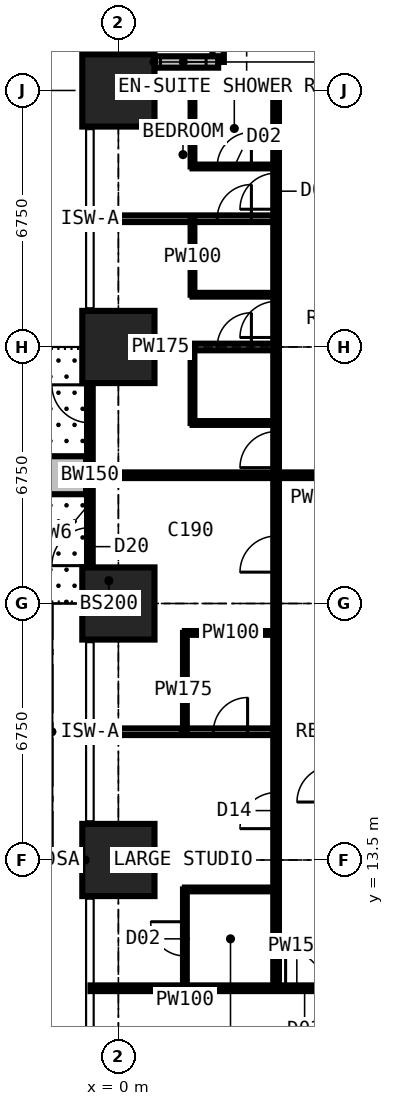
"""IFC4 building model, lengths in metres.
Left out: names, types, materials, properties, quantities, classifications, styles, units other than length and angle.
Written with IfcOpenShell. Run it as: python <this file> out.ifc"""

import sys

from ifc_helpers import new_model, si_unit, direction, frame, frame_2d, origin, origin_2d, place, context, subcontext, project, spatial, rectangle, extrude, element, fill, save


model = new_model("IFC4")
c1 = context("Model", 3, precision=1e-05, world=origin(), true_north=direction((0.0, 1.0)))
c2 = subcontext(c1, "Body", "Model", "MODEL_VIEW")
j1 = project(units=[si_unit("LENGTHUNIT", "METRE"), si_unit("PLANEANGLEUNIT", "RADIAN")], contexts=[c1])
p1 = place(None, origin())
s1 = spatial("IfcSite", under=j1, at=p1, CompositionType="ELEMENT")
p2 = place(p1, origin())
s2 = spatial("IfcBuilding", under=s1, at=p2, CompositionType="ELEMENT")
p3 = place(p2, frame((0.0, 0.0, 43.2)))
s3 = spatial("IfcBuildingStorey", under=s2, at=p3, CompositionType="ELEMENT", Elevation=43.2)
for number, where, z_axis, x_axis in (
    (1, (0.0, 13.5, 0.0), (0.0, 0.0, 1.0), (1.0, 0.0, 0.0)),
    (2, (0.0, 20.25, 0.0), (0.0, 0.0, 1.0), (1.0, 0.0, 0.0)),
    (3, (0.0, 27.0, 0.0), (0.0, 0.0, 1.0), (1.0, 0.0, 0.0)),
    (4, (0.0, 33.75, 0.0), (0.0, 0.0, 1.0), (1.0, 0.0, 0.0)),
):
    element("IfcColumn", number, at=place(p3, frame(where, z_axis=z_axis, x_axis=x_axis)), inside=s3, PredefinedType="COLUMN", context=c2, shape_type="SweptSolid", body=[
        extrude(rectangle(XDim=1.9, YDim=1.9, at=origin_2d()), origin(), (0.0, 0.0, 1.0), 3.6),
    ])
p4 = place(p3, frame((2.625, 37.875, 0.0), z_axis=(0.0, 0.0, 1.0), x_axis=(0.0, -1.0, 0.0)))
e5 = element("IfcWall", 5, at=p4, inside=s3, PredefinedType="SOLIDWALL", context=c2, shape_type="SweptSolid", body=[
    extrude(rectangle(XDim=3.375, YDim=0.3, at=frame_2d((1.688, 0.0))), origin(), (0.0, 0.0, 1.0), 3.375),
])
p5 = place(p4, frame((0.788, 0.0, 0.6)))
e6 = element("IfcOpeningElement", 6, at=p5, cuts=e5, PredefinedType="OPENING", context=c2, shape_type="SweptSolid", body=[
    extrude(rectangle(XDim=1.8, YDim=2.1, at=frame_2d((0.9, 1.05))), frame((0.0, 0.16, 0.0), z_axis=(0.0, -1.0, 0.0), x_axis=(1.0, 0.0, 0.0)), (0.0, 0.0, 1.0), 0.32),
])
p6 = place(p3, frame((2.625, 34.5, 0.0), z_axis=(0.0, 0.0, 1.0), x_axis=(-1.0, 0.0, 0.0)))
e7 = element("IfcWall", 7, at=p6, inside=s3, PredefinedType="SOLIDWALL", context=c2, shape_type="SweptSolid", body=[
    extrude(rectangle(XDim=3.375, YDim=0.3, at=frame_2d((1.688, 0.0))), origin(), (0.0, 0.0, 1.0), 3.375),
])
p7 = place(p6, frame((0.317, 0.0, 0.9)))
e8 = element("IfcOpeningElement", 8, at=p7, cuts=e7, PredefinedType="OPENING", context=c2, shape_type="SweptSolid", body=[
    extrude(rectangle(XDim=1.2, YDim=1.8, at=frame_2d((0.6, 0.9))), frame((0.0, 0.16, 0.0), z_axis=(0.0, -1.0, 0.0), x_axis=(1.0, 0.0, 0.0)), (0.0, 0.0, 1.0), 0.32),
])
p8 = place(p3, frame((-0.75, 20.25, 0.0), z_axis=(0.0, 0.0, 1.0), x_axis=(0.0, 1.0, 0.0)))
e9 = element("IfcWall", 9, at=p8, inside=s3, PredefinedType="SOLIDWALL", context=c2, shape_type="SweptSolid", body=[
    extrude(rectangle(XDim=6.75, YDim=0.15, at=frame_2d((3.375, 0.0))), origin(), (0.0, 0.0, 1.0), 3.375),
])
p9 = place(p8, frame((0.996, 0.0, 0.0)))
e10 = element("IfcOpeningElement", 10, at=p9, cuts=e9, PredefinedType="OPENING", context=c2, shape_type="SweptSolid", body=[
    extrude(rectangle(XDim=1.0, YDim=2.2, at=frame_2d((0.5, 1.1))), frame((0.0, 0.085, 0.0), z_axis=(0.0, -1.0, 0.0), x_axis=(1.0, 0.0, 0.0)), (0.0, 0.0, 1.0), 0.17),
])
p10 = place(p8, frame((2.042, 0.0, 0.9)))
e11 = element("IfcOpeningElement", 11, at=p10, cuts=e9, PredefinedType="OPENING", context=c2, shape_type="SweptSolid", body=[
    extrude(rectangle(XDim=1.2, YDim=1.8, at=frame_2d((0.6, 0.9))), frame((0.0, 0.085, 0.0), z_axis=(0.0, -1.0, 0.0), x_axis=(1.0, 0.0, 0.0)), (0.0, 0.0, 1.0), 0.17),
])
p11 = place(p8, frame((4.754, 0.0, 0.0)))
e12 = element("IfcOpeningElement", 12, at=p11, cuts=e9, PredefinedType="OPENING", context=c2, shape_type="SweptSolid", body=[
    extrude(rectangle(XDim=1.0, YDim=2.2, at=frame_2d((0.5, 1.1))), frame((0.0, 0.085, 0.0), z_axis=(0.0, -1.0, 0.0), x_axis=(1.0, 0.0, 0.0)), (0.0, 0.0, 1.0), 0.17),
])
p12 = place(p8, frame((3.508, 0.0, 0.9)))
e13 = element("IfcOpeningElement", 13, at=p12, cuts=e9, PredefinedType="OPENING", context=c2, shape_type="SweptSolid", body=[
    extrude(rectangle(XDim=1.2, YDim=1.8, at=frame_2d((0.6, 0.9))), frame((0.0, 0.085, 0.0), z_axis=(0.0, -1.0, 0.0), x_axis=(1.0, 0.0, 0.0)), (0.0, 0.0, 1.0), 0.17),
])
p13 = place(p3, frame((-0.85, 23.625, 0.0), z_axis=(0.0, 0.0, 1.0), x_axis=(-1.0, 0.0, 0.0)))
e14 = element("IfcWall", 14, at=p13, inside=s3, PredefinedType="USERDEFINED", context=c2, shape_type="SweptSolid", body=[
    extrude(rectangle(XDim=2.2, YDim=1.0, at=frame_2d((1.1, 0.0))), origin(), (0.0, 0.0, 1.0), 0.9),
])
p14 = place(p3, frame((-0.734, 10.125, 0.0), z_axis=(0.0, 0.0, 1.0), x_axis=(1.0, 0.0, 0.0)))
e15 = element("IfcWall", 15, at=p14, inside=s3, PredefinedType="PARTITIONING", context=c2, shape_type="SweptSolid", body=[
    extrude(rectangle(XDim=10.859, YDim=0.15, at=frame_2d((5.429, 0.0))), origin(), (0.0, 0.0, 1.0), 3.375),
])
p15 = place(p14, frame((5.134, 0.0, 0.0)))
e16 = element("IfcOpeningElement", 16, at=p15, cuts=e15, PredefinedType="OPENING", context=c2, shape_type="SweptSolid", body=[
    extrude(rectangle(XDim=1.0, YDim=2.2, at=frame_2d((0.5, 1.1))), frame((0.0, 0.085, 0.0), z_axis=(0.0, -1.0, 0.0), x_axis=(1.0, 0.0, 0.0)), (0.0, 0.0, 1.0), 0.17),
])
p16 = place(p3, frame((-0.734, 16.875, 0.0), z_axis=(0.0, 0.0, 1.0), x_axis=(1.0, 0.0, 0.0)))
e17 = element("IfcWall", 17, at=p16, inside=s3, PredefinedType="PARTITIONING", context=c2, shape_type="SweptSolid", body=[
    extrude(rectangle(XDim=4.884, YDim=0.175, at=frame_2d((2.442, 0.0))), origin(), (0.0, 0.0, 1.0), 3.375),
])
p17 = place(p16, frame((3.234, 0.0, 0.0)))
e18 = element("IfcOpeningElement", 18, at=p17, cuts=e17, PredefinedType="OPENING", context=c2, shape_type="SweptSolid", body=[
    extrude(rectangle(XDim=0.9, YDim=2.2, at=frame_2d((0.45, 1.1))), frame((0.0, 0.097, 0.0), z_axis=(0.0, -1.0, 0.0), x_axis=(1.0, 0.0, 0.0)), (0.0, 0.0, 1.0), 0.195),
])
p18 = place(p3, frame((-0.734, 23.625, 0.0), z_axis=(0.0, 0.0, 1.0), x_axis=(1.0, 0.0, 0.0)))
e19 = element("IfcWall", 19, at=p18, inside=s3, PredefinedType="PARTITIONING", context=c2, shape_type="SweptSolid", body=[
    extrude(rectangle(XDim=12.034, YDim=0.15, at=frame_2d((6.017, 0.0))), origin(), (0.0, 0.0, 1.0), 3.375),
])
p19 = place(p3, frame((-0.734, 27.0, 0.0), z_axis=(0.0, 0.0, 1.0), x_axis=(1.0, 0.0, 0.0)))
e20 = element("IfcWall", 20, at=p19, inside=s3, PredefinedType="PARTITIONING", context=c2, shape_type="SweptSolid", body=[
    extrude(rectangle(XDim=4.884, YDim=0.175, at=frame_2d((2.442, 0.0))), origin(), (0.0, 0.0, 1.0), 2.61),
])
p20 = place(p19, frame((3.334, 0.0, 0.0)))
e21 = element("IfcOpeningElement", 21, at=p20, cuts=e20, PredefinedType="OPENING", context=c2, shape_type="SweptSolid", body=[
    extrude(rectangle(XDim=0.9, YDim=2.2, at=frame_2d((0.45, 1.1))), frame((0.0, 0.097, 0.0), z_axis=(0.0, -1.0, 0.0), x_axis=(1.0, 0.0, 0.0)), (0.0, 0.0, 1.0), 0.195),
])
p21 = place(p3, frame((-0.734, 30.375, 0.0), z_axis=(0.0, 0.0, 1.0), x_axis=(1.0, 0.0, 0.0)))
e22 = element("IfcWall", 22, at=p21, inside=s3, PredefinedType="PARTITIONING", context=c2, shape_type="SweptSolid", body=[
    extrude(rectangle(XDim=4.884, YDim=0.175, at=frame_2d((2.442, 0.0))), origin(), (0.0, 0.0, 1.0), 3.375),
])
p22 = place(p21, frame((3.334, 0.0, 0.0)))
e23 = element("IfcOpeningElement", 23, at=p22, cuts=e22, PredefinedType="OPENING", context=c2, shape_type="SweptSolid", body=[
    extrude(rectangle(XDim=0.9, YDim=2.2, at=frame_2d((0.45, 1.1))), frame((0.0, 0.097, 0.0), z_axis=(0.0, -1.0, 0.0), x_axis=(1.0, 0.0, 0.0)), (0.0, 0.0, 1.0), 0.195),
])
p23 = place(p3, frame((-0.734, 33.75, 0.0), z_axis=(0.0, 0.0, 1.0), x_axis=(1.0, 0.0, 0.0)))
e24 = element("IfcWall", 24, at=p23, inside=s3, PredefinedType="PARTITIONING", context=c2, shape_type="SweptSolid", body=[
    extrude(rectangle(XDim=10.859, YDim=0.15, at=frame_2d((5.429, 0.0))), origin(), (0.0, 0.0, 1.0), 2.877),
])
p24 = place(p23, frame((8.434, 0.0, 0.0)))
e25 = element("IfcOpeningElement", 25, at=p24, cuts=e24, PredefinedType="OPENING", context=c2, shape_type="SweptSolid", body=[
    extrude(rectangle(XDim=1.0, YDim=2.2, at=frame_2d((0.5, 1.1))), frame((0.0, 0.085, 0.0), z_axis=(0.0, -1.0, 0.0), x_axis=(1.0, 0.0, 0.0)), (0.0, 0.0, 1.0), 0.17),
])
p25 = place(p3, frame((1.75, 10.125, 0.0), z_axis=(0.0, 0.0, 1.0), x_axis=(0.0, 1.0, 0.0)))
e26 = element("IfcWall", 26, at=p25, inside=s3, PredefinedType="PARTITIONING", context=c2, shape_type="SweptSolid", body=[
    extrude(rectangle(XDim=2.6, YDim=0.1, at=frame_2d((1.3, 0.0))), origin(), (0.0, 0.0, 1.0), 3.375),
])
p26 = place(p25, frame((0.85, 0.0, 0.0)))
e27 = element("IfcOpeningElement", 27, at=p26, cuts=e26, PredefinedType="OPENING", context=c2, shape_type="SweptSolid", body=[
    extrude(rectangle(XDim=0.9, YDim=2.2, at=frame_2d((0.45, 1.1))), frame((0.0, 0.06, 0.0), z_axis=(0.0, -1.0, 0.0), x_axis=(1.0, 0.0, 0.0)), (0.0, 0.0, 1.0), 0.12),
])
p27 = place(p3, frame((1.75, 12.725, 0.0), z_axis=(0.0, 0.0, 1.0), x_axis=(1.0, 0.0, 0.0)))
e28 = element("IfcWall", 28, at=p27, inside=s3, PredefinedType="PARTITIONING", context=c2, shape_type="SweptSolid", body=[
    extrude(rectangle(XDim=2.4, YDim=0.1, at=frame_2d((1.2, 0.0))), origin(), (0.0, 0.0, 1.0), 3.375),
])
p28 = place(p3, frame((1.75, 16.875, 0.0), z_axis=(0.0, 0.0, 1.0), x_axis=(0.0, 1.0, 0.0)))
e29 = element("IfcWall", 29, at=p28, inside=s3, PredefinedType="PARTITIONING", context=c2, shape_type="SweptSolid", body=[
    extrude(rectangle(XDim=2.6, YDim=0.1, at=frame_2d((1.3, 0.0))), origin(), (0.0, 0.0, 1.0), 3.375),
])
p29 = place(p3, frame((1.75, 19.475, 0.0), z_axis=(0.0, 0.0, 1.0), x_axis=(1.0, 0.0, 0.0)))
e30 = element("IfcWall", 30, at=p29, inside=s3, PredefinedType="PARTITIONING", context=c2, shape_type="SweptSolid", body=[
    extrude(rectangle(XDim=2.4, YDim=0.1, at=frame_2d((1.2, 0.0))), origin(), (0.0, 0.0, 1.0), 3.375),
])
p30 = place(p3, frame((1.95, 25.0, 0.0), z_axis=(0.0, 0.0, 1.0), x_axis=(0.0, 1.0, 0.0)))
e31 = element("IfcWall", 31, at=p30, inside=s3, PredefinedType="PARTITIONING", context=c2, shape_type="SweptSolid", body=[
    extrude(rectangle(XDim=2.0, YDim=0.1, at=frame_2d((1.0, 0.0))), origin(), (0.0, 0.0, 1.0), 3.375),
])
p31 = place(p3, frame((1.95, 25.0, 0.0), z_axis=(0.0, 0.0, 1.0), x_axis=(1.0, 0.0, 0.0)))
e32 = element("IfcWall", 32, at=p31, inside=s3, PredefinedType="PARTITIONING", context=c2, shape_type="SweptSolid", body=[
    extrude(rectangle(XDim=2.2, YDim=0.1, at=frame_2d((1.1, 0.0))), origin(), (0.0, 0.0, 1.0), 3.375),
])
p32 = place(p3, frame((1.95, 28.375, 0.0), z_axis=(0.0, 0.0, 1.0), x_axis=(0.0, 1.0, 0.0)))
e33 = element("IfcWall", 33, at=p32, inside=s3, PredefinedType="PARTITIONING", context=c2, shape_type="SweptSolid", body=[
    extrude(rectangle(XDim=2.0, YDim=0.1, at=frame_2d((1.0, 0.0))), origin(), (0.0, 0.0, 1.0), 3.375),
])
p33 = place(p3, frame((1.95, 28.375, 0.0), z_axis=(0.0, 0.0, 1.0), x_axis=(1.0, 0.0, 0.0)))
e34 = element("IfcWall", 34, at=p33, inside=s3, PredefinedType="PARTITIONING", context=c2, shape_type="SweptSolid", body=[
    extrude(rectangle(XDim=2.2, YDim=0.1, at=frame_2d((1.1, 0.0))), origin(), (0.0, 0.0, 1.0), 3.375),
])
p34 = place(p3, frame((1.95, 31.75, 0.0), z_axis=(0.0, 0.0, 1.0), x_axis=(0.0, 1.0, 0.0)))
e35 = element("IfcWall", 35, at=p34, inside=s3, PredefinedType="PARTITIONING", context=c2, shape_type="SweptSolid", body=[
    extrude(rectangle(XDim=2.0, YDim=0.1, at=frame_2d((1.0, 0.0))), origin(), (0.0, 0.0, 1.0), 3.375),
])
p35 = place(p3, frame((1.95, 31.75, 0.0), z_axis=(0.0, 0.0, 1.0), x_axis=(1.0, 0.0, 0.0)))
e36 = element("IfcWall", 36, at=p35, inside=s3, PredefinedType="PARTITIONING", context=c2, shape_type="SweptSolid", body=[
    extrude(rectangle(XDim=2.2, YDim=0.1, at=frame_2d((1.1, 0.0))), origin(), (0.0, 0.0, 1.0), 3.375),
])
p36 = place(p35, frame((0.65, 0.0, 0.0)))
e37 = element("IfcOpeningElement", 37, at=p36, cuts=e36, PredefinedType="OPENING", context=c2, shape_type="SweptSolid", body=[
    extrude(rectangle(XDim=0.9, YDim=2.2, at=frame_2d((0.45, 1.1))), frame((0.0, 0.06, 0.0), z_axis=(0.0, -1.0, 0.0), x_axis=(1.0, 0.0, 0.0)), (0.0, 0.0, 1.0), 0.12),
])
p37 = place(p3, frame((4.15, 10.125, 0.0), z_axis=(0.0, 0.0, 1.0), x_axis=(0.0, 1.0, 0.0)))
e38 = element("IfcWall", 38, at=p37, inside=s3, PredefinedType="PARTITIONING", context=c2, shape_type="SweptSolid", body=[
    extrude(rectangle(XDim=23.625, YDim=0.15, at=frame_2d((11.812, 0.0))), origin(), (0.0, 0.0, 1.0), 3.375),
])
p38 = place(p37, frame((20.5, 0.0, 0.0)))
e39 = element("IfcOpeningElement", 39, at=p38, cuts=e38, PredefinedType="OPENING", context=c2, shape_type="SweptSolid", body=[
    extrude(rectangle(XDim=0.95, YDim=2.2, at=frame_2d((0.475, 1.1))), frame((0.0, 0.085, 0.0), z_axis=(0.0, -1.0, 0.0), x_axis=(1.0, 0.0, 0.0)), (0.0, 0.0, 1.0), 0.17),
])
p39 = place(p37, frame((17.125, 0.0, 0.0)))
e40 = element("IfcOpeningElement", 40, at=p39, cuts=e38, PredefinedType="OPENING", context=c2, shape_type="SweptSolid", body=[
    extrude(rectangle(XDim=0.95, YDim=2.2, at=frame_2d((0.475, 1.1))), frame((0.0, 0.085, 0.0), z_axis=(0.0, -1.0, 0.0), x_axis=(1.0, 0.0, 0.0)), (0.0, 0.0, 1.0), 0.17),
])
p40 = place(p37, frame((13.7, 0.0, 0.0)))
e41 = element("IfcOpeningElement", 41, at=p40, cuts=e38, PredefinedType="OPENING", context=c2, shape_type="SweptSolid", body=[
    extrude(rectangle(XDim=0.95, YDim=2.2, at=frame_2d((0.475, 1.1))), frame((0.0, 0.085, 0.0), z_axis=(0.0, -1.0, 0.0), x_axis=(1.0, 0.0, 0.0)), (0.0, 0.0, 1.0), 0.17),
])
p41 = place(p37, frame((4.2, 0.0, 0.0)))
e42 = element("IfcOpeningElement", 42, at=p41, cuts=e38, PredefinedType="OPENING", context=c2, shape_type="SweptSolid", body=[
    extrude(rectangle(XDim=0.95, YDim=2.2, at=frame_2d((0.475, 1.1))), frame((0.0, 0.085, 0.0), z_axis=(0.0, -1.0, 0.0), x_axis=(1.0, 0.0, 0.0)), (0.0, 0.0, 1.0), 0.17),
])
p42 = place(p37, frame((10.95, 0.0, 0.0)))
e43 = element("IfcOpeningElement", 43, at=p42, cuts=e38, PredefinedType="OPENING", context=c2, shape_type="SweptSolid", body=[
    extrude(rectangle(XDim=0.95, YDim=2.2, at=frame_2d((0.475, 1.1))), frame((0.0, 0.085, 0.0), z_axis=(0.0, -1.0, 0.0), x_axis=(1.0, 0.0, 0.0)), (0.0, 0.0, 1.0), 0.17),
])
p43 = place(p7, origin())
e44 = element("IfcWindow", 44, at=p43, inside=s3, PartitioningType="SINGLE_PANEL", PredefinedType="WINDOW", context=c2, shape_type="SweptSolid", body=[
    extrude(rectangle(XDim=1.2, YDim=1.8, at=frame_2d((0.6, 0.9))), frame((0.0, 0.03, 0.0), z_axis=(0.0, -1.0, 0.0), x_axis=(1.0, 0.0, 0.0)), (0.0, 0.0, 1.0), 0.06),
])
fill(e8, e44)
p44 = place(p9, origin())
e45 = element("IfcDoor", 45, at=p44, inside=s3, OperationType="SINGLE_SWING_LEFT", PredefinedType="DOOR", context=c2, shape_type="SweptSolid", body=[
    extrude(rectangle(XDim=1.0, YDim=2.2, at=frame_2d((0.5, 1.1))), frame((0.0, 0.025, 0.0), z_axis=(0.0, -1.0, 0.0), x_axis=(1.0, 0.0, 0.0)), (0.0, 0.0, 1.0), 0.05),
])
fill(e10, e45)
p45 = place(p10, origin())
e46 = element("IfcWindow", 46, at=p45, inside=s3, PartitioningType="SINGLE_PANEL", PredefinedType="WINDOW", context=c2, shape_type="SweptSolid", body=[
    extrude(rectangle(XDim=1.2, YDim=1.8, at=frame_2d((0.6, 0.9))), frame((0.0, 0.03, 0.0), z_axis=(0.0, -1.0, 0.0), x_axis=(1.0, 0.0, 0.0)), (0.0, 0.0, 1.0), 0.06),
])
fill(e11, e46)
p46 = place(p11, origin())
e47 = element("IfcDoor", 47, at=p46, inside=s3, OperationType="SINGLE_SWING_RIGHT", PredefinedType="DOOR", context=c2, shape_type="SweptSolid", body=[
    extrude(rectangle(XDim=1.0, YDim=2.2, at=frame_2d((0.5, 1.1))), frame((0.0, 0.025, 0.0), z_axis=(0.0, -1.0, 0.0), x_axis=(1.0, 0.0, 0.0)), (0.0, 0.0, 1.0), 0.05),
])
fill(e12, e47)
p47 = place(p12, origin())
e48 = element("IfcWindow", 48, at=p47, inside=s3, PartitioningType="SINGLE_PANEL", PredefinedType="WINDOW", context=c2, shape_type="SweptSolid", body=[
    extrude(rectangle(XDim=1.2, YDim=1.8, at=frame_2d((0.6, 0.9))), frame((0.0, 0.03, 0.0), z_axis=(0.0, -1.0, 0.0), x_axis=(1.0, 0.0, 0.0)), (0.0, 0.0, 1.0), 0.06),
])
fill(e13, e48)
p48 = place(p15, origin())
e49 = element("IfcDoor", 49, at=p48, inside=s3, OperationType="SINGLE_SWING_LEFT", PredefinedType="DOOR", context=c2, shape_type="SweptSolid", body=[
    extrude(rectangle(XDim=1.0, YDim=2.2, at=frame_2d((0.5, 1.1))), frame((0.0, 0.025, 0.0), z_axis=(0.0, -1.0, 0.0), x_axis=(1.0, 0.0, 0.0)), (0.0, 0.0, 1.0), 0.05),
])
fill(e16, e49)
p49 = place(p38, origin())
e50 = element("IfcDoor", 50, at=p49, inside=s3, OperationType="SINGLE_SWING_LEFT", PredefinedType="DOOR", context=c2, shape_type="SweptSolid", body=[
    extrude(rectangle(XDim=0.95, YDim=2.2, at=frame_2d((0.475, 1.1))), frame((0.0, 0.025, 0.0), z_axis=(0.0, -1.0, 0.0), x_axis=(1.0, 0.0, 0.0)), (0.0, 0.0, 1.0), 0.05),
])
fill(e39, e50)
p50 = place(p36, origin())
e51 = element("IfcDoor", 51, at=p50, inside=s3, OperationType="SINGLE_SWING_RIGHT", PredefinedType="DOOR", context=c2, shape_type="SweptSolid", body=[
    extrude(rectangle(XDim=0.9, YDim=2.2, at=frame_2d((0.45, 1.1))), frame((0.0, 0.025, 0.0), z_axis=(0.0, -1.0, 0.0), x_axis=(1.0, 0.0, 0.0)), (0.0, 0.0, 1.0), 0.05),
])
fill(e37, e51)
p51 = place(p39, origin())
e52 = element("IfcDoor", 52, at=p51, inside=s3, OperationType="SINGLE_SWING_LEFT", PredefinedType="DOOR", context=c2, shape_type="SweptSolid", body=[
    extrude(rectangle(XDim=0.95, YDim=2.2, at=frame_2d((0.475, 1.1))), frame((0.0, 0.025, 0.0), z_axis=(0.0, -1.0, 0.0), x_axis=(1.0, 0.0, 0.0)), (0.0, 0.0, 1.0), 0.05),
])
fill(e40, e52)
p52 = place(p22, origin())
e53 = element("IfcDoor", 53, at=p52, inside=s3, OperationType="SINGLE_SWING_RIGHT", PredefinedType="DOOR", context=c2, shape_type="SweptSolid", body=[
    extrude(rectangle(XDim=0.9, YDim=2.2, at=frame_2d((0.45, 1.1))), frame((0.0, 0.025, 0.0), z_axis=(0.0, -1.0, 0.0), x_axis=(1.0, 0.0, 0.0)), (0.0, 0.0, 1.0), 0.05),
])
fill(e23, e53)
p53 = place(p40, origin())
e54 = element("IfcDoor", 54, at=p53, inside=s3, OperationType="SINGLE_SWING_LEFT", PredefinedType="DOOR", context=c2, shape_type="SweptSolid", body=[
    extrude(rectangle(XDim=0.95, YDim=2.2, at=frame_2d((0.475, 1.1))), frame((0.0, 0.025, 0.0), z_axis=(0.0, -1.0, 0.0), x_axis=(1.0, 0.0, 0.0)), (0.0, 0.0, 1.0), 0.05),
])
fill(e41, e54)
p54 = place(p20, origin())
e55 = element("IfcDoor", 55, at=p54, inside=s3, OperationType="SINGLE_SWING_RIGHT", PredefinedType="DOOR", context=c2, shape_type="SweptSolid", body=[
    extrude(rectangle(XDim=0.9, YDim=2.2, at=frame_2d((0.45, 1.1))), frame((0.0, 0.025, 0.0), z_axis=(0.0, -1.0, 0.0), x_axis=(1.0, 0.0, 0.0)), (0.0, 0.0, 1.0), 0.05),
])
fill(e21, e55)
p55 = place(p41, origin())
e56 = element("IfcDoor", 56, at=p55, inside=s3, OperationType="SINGLE_SWING_LEFT", PredefinedType="DOOR", context=c2, shape_type="SweptSolid", body=[
    extrude(rectangle(XDim=0.95, YDim=2.2, at=frame_2d((0.475, 1.1))), frame((0.0, 0.025, 0.0), z_axis=(0.0, -1.0, 0.0), x_axis=(1.0, 0.0, 0.0)), (0.0, 0.0, 1.0), 0.05),
])
fill(e42, e56)
p56 = place(p26, origin())
e57 = element("IfcDoor", 57, at=p56, inside=s3, OperationType="SINGLE_SWING_RIGHT", PredefinedType="DOOR", context=c2, shape_type="SweptSolid", body=[
    extrude(rectangle(XDim=0.9, YDim=2.2, at=frame_2d((0.45, 1.1))), frame((0.0, 0.025, 0.0), z_axis=(0.0, -1.0, 0.0), x_axis=(1.0, 0.0, 0.0)), (0.0, 0.0, 1.0), 0.05),
])
fill(e27, e57)
p57 = place(p42, origin())
e58 = element("IfcDoor", 58, at=p57, inside=s3, OperationType="SINGLE_SWING_LEFT", PredefinedType="DOOR", context=c2, shape_type="SweptSolid", body=[
    extrude(rectangle(XDim=0.95, YDim=2.2, at=frame_2d((0.475, 1.1))), frame((0.0, 0.025, 0.0), z_axis=(0.0, -1.0, 0.0), x_axis=(1.0, 0.0, 0.0)), (0.0, 0.0, 1.0), 0.05),
])
fill(e43, e58)
p58 = place(p17, origin())
e59 = element("IfcDoor", 59, at=p58, inside=s3, OperationType="SINGLE_SWING_RIGHT", PredefinedType="DOOR", context=c2, shape_type="SweptSolid", body=[
    extrude(rectangle(XDim=0.9, YDim=2.2, at=frame_2d((0.45, 1.1))), frame((0.0, 0.025, 0.0), z_axis=(0.0, -1.0, 0.0), x_axis=(1.0, 0.0, 0.0)), (0.0, 0.0, 1.0), 0.05),
])
fill(e18, e59)
save(model, sys.argv[1])
